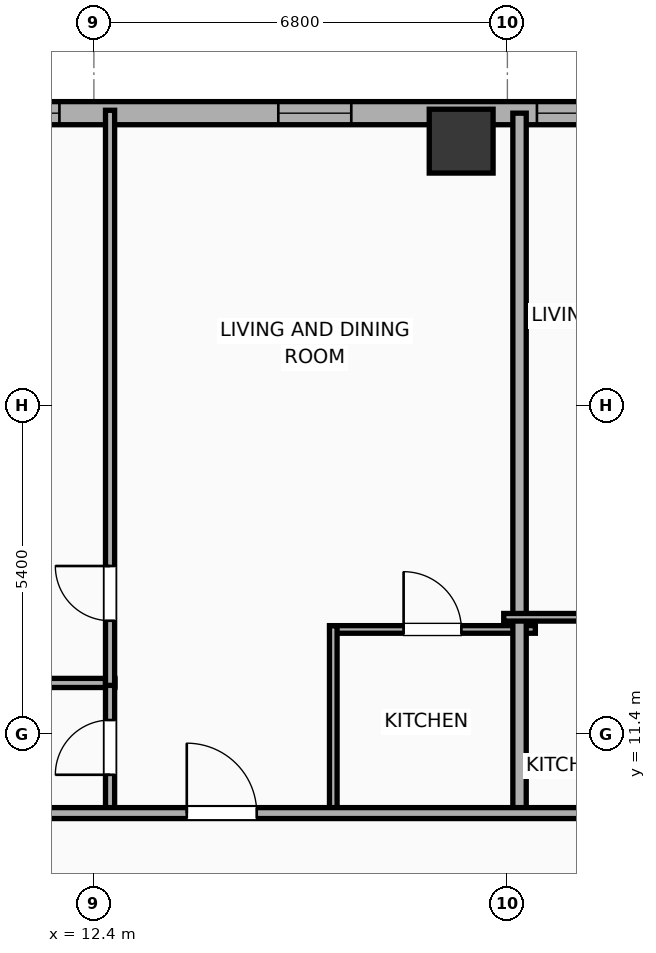
"""IFC4 building model, lengths in metres.
Left out: names, types, materials, properties, quantities, classifications, styles, units other than length and angle.
Written with IfcOpenShell. Run it as: python <this file> out.ifc"""

import sys

from ifc_helpers import new_model, si_unit, direction, frame, frame_2d, origin, origin_2d, place, context, subcontext, project, spatial, rectangle, hollow_rectangle, extrude, element, fill, save


model = new_model("IFC4")
c1 = context("Model", 3, precision=1e-05, world=origin(), true_north=direction((0.0, 1.0)))
c2 = subcontext(c1, "Body", "Model", "MODEL_VIEW")
j1 = project(units=[si_unit("LENGTHUNIT", "METRE"), si_unit("PLANEANGLEUNIT", "RADIAN")], contexts=[c1])
p1 = place(None, origin())
s1 = spatial("IfcSite", under=j1, at=p1, CompositionType="ELEMENT")
p2 = place(p1, origin())
s2 = spatial("IfcBuilding", under=s1, at=p2, CompositionType="ELEMENT")
p3 = place(p2, frame((0.0, 0.0, 101.4)))
s3 = spatial("IfcBuildingStorey", under=s2, at=p3, CompositionType="ELEMENT", Elevation=101.4)
p4 = place(p3, frame((18.44, 21.15, 0.0), z_axis=(0.0, 0.0, 1.0), x_axis=(1.0, 0.0, 0.0)))
e1 = element("IfcColumn", 1, at=p4, inside=s3, PredefinedType="COLUMN", context=c2, shape_type="SweptSolid", body=[
    extrude(hollow_rectangle(XDim=1.05, YDim=1.05, WallThickness=0.036, at=origin_2d()), origin(), (0.0, 0.0, 1.0), 3.9),
])
p5 = place(p3, frame((-25.381, 21.61, 0.0), z_axis=(0.0, 0.0, 1.0), x_axis=(1.0, 0.0, 0.0)))
e2 = element("IfcWall", 2, at=p5, inside=s3, PredefinedType="ELEMENTEDWALL", context=c2, shape_type="SweptSolid", body=[
    extrude(rectangle(XDim=54.763, YDim=0.38, at=frame_2d((27.381, 0.0))), origin(), (0.0, 0.0, 1.0), 3.65),
])
p6 = place(p5, frame((45.067, 0.0, 0.75)))
e3 = element("IfcOpeningElement", 3, at=p6, cuts=e2, PredefinedType="OPENING", context=c2, shape_type="SweptSolid", body=[
    extrude(rectangle(XDim=2.4, YDim=2.1, at=frame_2d((1.2, 1.05))), frame((0.0, 0.2, 0.0), z_axis=(0.0, -1.0, 0.0), x_axis=(1.0, 0.0, 0.0)), (0.0, 0.0, 1.0), 0.4),
])
p7 = place(p5, frame((4.076, 0.0, 0.75)))
e4 = element("IfcOpeningElement", 4, at=p7, cuts=e2, PredefinedType="OPENING", context=c2, shape_type="SweptSolid", body=[
    extrude(rectangle(XDim=1.2, YDim=2.05, at=frame_2d((0.6, 1.025))), frame((0.0, 0.2, 0.0), z_axis=(0.0, -1.0, 0.0), x_axis=(1.0, 0.0, 0.0)), (0.0, 0.0, 1.0), 0.4),
])
p8 = place(p5, frame((9.395, 0.0, 0.75)))
e5 = element("IfcOpeningElement", 5, at=p8, cuts=e2, PredefinedType="OPENING", context=c2, shape_type="SweptSolid", body=[
    extrude(rectangle(XDim=0.85, YDim=2.05, at=frame_2d((0.425, 1.025))), frame((0.0, 0.2, 0.0), z_axis=(0.0, -1.0, 0.0), x_axis=(1.0, 0.0, 0.0)), (0.0, 0.0, 1.0), 0.4),
])
p9 = place(p5, frame((7.205, 0.0, 0.75)))
e6 = element("IfcOpeningElement", 6, at=p9, cuts=e2, PredefinedType="OPENING", context=c2, shape_type="SweptSolid", body=[
    extrude(rectangle(XDim=1.2, YDim=2.05, at=frame_2d((0.6, 1.025))), frame((0.0, 0.2, 0.0), z_axis=(0.0, -1.0, 0.0), x_axis=(1.0, 0.0, 0.0)), (0.0, 0.0, 1.0), 0.4),
])
p10 = place(p5, frame((13.676, 0.0, 0.75)))
e7 = element("IfcOpeningElement", 7, at=p10, cuts=e2, PredefinedType="OPENING", context=c2, shape_type="SweptSolid", body=[
    extrude(rectangle(XDim=1.2, YDim=2.05, at=frame_2d((0.6, 1.025))), frame((0.0, 0.2, 0.0), z_axis=(0.0, -1.0, 0.0), x_axis=(1.0, 0.0, 0.0)), (0.0, 0.0, 1.0), 0.4),
])
p11 = place(p5, frame((17.136, 0.0, 0.75)))
e8 = element("IfcOpeningElement", 8, at=p11, cuts=e2, PredefinedType="OPENING", context=c2, shape_type="SweptSolid", body=[
    extrude(rectangle(XDim=1.2, YDim=2.05, at=frame_2d((0.6, 1.025))), frame((0.0, 0.2, 0.0), z_axis=(0.0, -1.0, 0.0), x_axis=(1.0, 0.0, 0.0)), (0.0, 0.0, 1.0), 0.4),
])
p12 = place(p5, frame((22.656, 0.0, 0.75)))
e9 = element("IfcOpeningElement", 9, at=p12, cuts=e2, PredefinedType="OPENING", context=c2, shape_type="SweptSolid", body=[
    extrude(rectangle(XDim=1.2, YDim=2.05, at=frame_2d((0.6, 1.025))), frame((0.0, 0.2, 0.0), z_axis=(0.0, -1.0, 0.0), x_axis=(1.0, 0.0, 0.0)), (0.0, 0.0, 1.0), 0.4),
])
p13 = place(p5, frame((29.443, 0.0, 0.75)))
e10 = element("IfcOpeningElement", 10, at=p13, cuts=e2, PredefinedType="OPENING", context=c2, shape_type="SweptSolid", body=[
    extrude(rectangle(XDim=1.2, YDim=2.05, at=frame_2d((0.6, 1.025))), frame((0.0, 0.2, 0.0), z_axis=(0.0, -1.0, 0.0), x_axis=(1.0, 0.0, 0.0)), (0.0, 0.0, 1.0), 0.4),
])
p14 = place(p5, frame((26.348, 0.0, 0.75)))
e11 = element("IfcOpeningElement", 11, at=p14, cuts=e2, PredefinedType="OPENING", context=c2, shape_type="SweptSolid", body=[
    extrude(rectangle(XDim=1.2, YDim=2.05, at=frame_2d((0.6, 1.025))), frame((0.0, 0.2, 0.0), z_axis=(0.0, -1.0, 0.0), x_axis=(1.0, 0.0, 0.0)), (0.0, 0.0, 1.0), 0.4),
])
p15 = place(p5, frame((33.596, 0.0, 0.75)))
e12 = element("IfcOpeningElement", 12, at=p15, cuts=e2, PredefinedType="OPENING", context=c2, shape_type="SweptSolid", body=[
    extrude(rectangle(XDim=1.2, YDim=2.05, at=frame_2d((0.6, 1.025))), frame((0.0, 0.2, 0.0), z_axis=(0.0, -1.0, 0.0), x_axis=(1.0, 0.0, 0.0)), (0.0, 0.0, 1.0), 0.4),
])
p16 = place(p5, frame((36.014, 0.0, 0.75)))
e13 = element("IfcOpeningElement", 13, at=p16, cuts=e2, PredefinedType="OPENING", context=c2, shape_type="SweptSolid", body=[
    extrude(rectangle(XDim=1.2, YDim=2.05, at=frame_2d((0.6, 1.025))), frame((0.0, 0.2, 0.0), z_axis=(0.0, -1.0, 0.0), x_axis=(1.0, 0.0, 0.0)), (0.0, 0.0, 1.0), 0.4),
])
p17 = place(p5, frame((40.814, 0.0, 0.75)))
e14 = element("IfcOpeningElement", 14, at=p17, cuts=e2, PredefinedType="OPENING", context=c2, shape_type="SweptSolid", body=[
    extrude(rectangle(XDim=1.2, YDim=2.05, at=frame_2d((0.6, 1.025))), frame((0.0, 0.2, 0.0), z_axis=(0.0, -1.0, 0.0), x_axis=(1.0, 0.0, 0.0)), (0.0, 0.0, 1.0), 0.4),
])
p18 = place(p5, frame((49.385, 0.0, 0.75)))
e15 = element("IfcOpeningElement", 15, at=p18, cuts=e2, PredefinedType="OPENING", context=c2, shape_type="SweptSolid", body=[
    extrude(rectangle(XDim=1.2, YDim=2.05, at=frame_2d((0.6, 1.025))), frame((0.0, 0.2, 0.0), z_axis=(0.0, -1.0, 0.0), x_axis=(1.0, 0.0, 0.0)), (0.0, 0.0, 1.0), 0.4),
])
p19 = place(p5, frame((52.181, 0.0, 0.75)))
e16 = element("IfcOpeningElement", 16, at=p19, cuts=e2, PredefinedType="OPENING", context=c2, shape_type="SweptSolid", body=[
    extrude(rectangle(XDim=1.2, YDim=2.05, at=frame_2d((0.6, 1.025))), frame((0.0, 0.2, 0.0), z_axis=(0.0, -1.0, 0.0), x_axis=(1.0, 0.0, 0.0)), (0.0, 0.0, 1.0), 0.4),
])
p20 = place(p3, frame((9.54, 12.24, 0.0), z_axis=(0.0, 0.0, 1.0), x_axis=(1.0, 0.0, 0.0)))
e17 = element("IfcWall", 17, at=p20, inside=s3, PredefinedType="PLUMBINGWALL", context=c2, shape_type="SweptSolid", body=[
    extrude(rectangle(XDim=3.206, YDim=0.15, at=frame_2d((1.603, 0.0))), origin(), (0.0, 0.0, 1.0), 3.65),
])
p21 = place(p3, frame((12.666, 10.08, 0.0), z_axis=(0.0, 0.0, 1.0), x_axis=(0.0, 1.0, 0.0)))
e18 = element("IfcWall", 18, at=p21, inside=s3, PredefinedType="PLUMBINGWALL", context=c2, shape_type="SweptSolid", body=[
    extrude(rectangle(XDim=2.2, YDim=0.15, at=frame_2d((1.1, 0.0))), origin(), (0.0, 0.0, 1.0), 3.65),
])
p22 = place(p21, frame((0.65, 0.0, 0.0)))
e19 = element("IfcOpeningElement", 19, at=p22, cuts=e18, PredefinedType="OPENING", context=c2, shape_type="SweptSolid", body=[
    extrude(rectangle(XDim=0.9, YDim=2.05, at=frame_2d((0.45, 1.025))), frame((0.0, 0.085, 0.0), z_axis=(0.0, -1.0, 0.0), x_axis=(1.0, 0.0, 0.0)), (0.0, 0.0, 1.0), 0.17),
])
p23 = place(p3, frame((12.666, 12.2, 0.0), z_axis=(0.0, 0.0, 1.0), x_axis=(0.0, 1.0, 0.0)))
e20 = element("IfcWall", 20, at=p23, inside=s3, PredefinedType="PLUMBINGWALL", context=c2, shape_type="SweptSolid", body=[
    extrude(rectangle(XDim=9.458, YDim=0.15, at=frame_2d((4.729, 0.0))), origin(), (0.0, 0.0, 1.0), 3.65),
])
p24 = place(p23, frame((1.063, 0.0, 0.0)))
e21 = element("IfcOpeningElement", 21, at=p24, cuts=e20, PredefinedType="OPENING", context=c2, shape_type="SweptSolid", body=[
    extrude(rectangle(XDim=0.9, YDim=2.05, at=frame_2d((0.45, 1.025))), frame((0.0, 0.085, 0.0), z_axis=(0.0, -1.0, 0.0), x_axis=(1.0, 0.0, 0.0)), (0.0, 0.0, 1.0), 0.17),
])
p25 = place(p3, frame((16.277, 13.12, 0.0), z_axis=(0.0, 0.0, 1.0), x_axis=(1.0, 0.0, 0.0)))
e22 = element("IfcWall", 22, at=p25, inside=s3, PredefinedType="PARTITIONING", context=c2, shape_type="SweptSolid", body=[
    extrude(rectangle(XDim=3.383, YDim=0.125, at=frame_2d((1.691, 0.0))), origin(), (0.0, 0.0, 1.0), 3.65),
])
p26 = place(p25, frame((1.217, 0.0, 0.0)))
e23 = element("IfcOpeningElement", 23, at=p26, cuts=e22, PredefinedType="OPENING", context=c2, shape_type="SweptSolid", body=[
    extrude(rectangle(XDim=0.95, YDim=2.05, at=frame_2d((0.475, 1.025))), frame((0.0, 0.073, 0.0), z_axis=(0.0, -1.0, 0.0), x_axis=(1.0, 0.0, 0.0)), (0.0, 0.0, 1.0), 0.145),
])
p27 = place(p3, frame((16.337, 10.08, 0.0), z_axis=(0.0, 0.0, 1.0), x_axis=(0.0, 1.0, 0.0)))
e24 = element("IfcWall", 24, at=p27, inside=s3, PredefinedType="PARTITIONING", context=c2, shape_type="SweptSolid", body=[
    extrude(rectangle(XDim=3.1, YDim=0.125, at=frame_2d((1.55, 0.0))), origin(), (0.0, 0.0, 1.0), 3.65),
])
p28 = place(p3, frame((19.4, 10.02, 0.0), z_axis=(0.0, 0.0, 1.0), x_axis=(0.0, 1.0, 0.0)))
e25 = element("IfcWall", 25, at=p28, inside=s3, PredefinedType="PARTITIONING", context=c2, shape_type="SweptSolid", body=[
    extrude(rectangle(XDim=11.59, YDim=0.22, at=frame_2d((5.795, 0.0))), origin(), (0.0, 0.0, 1.0), 3.65),
])
p29 = place(p3, frame((19.14, 13.32, 0.0), z_axis=(0.0, 0.0, 1.0), x_axis=(1.0, 0.0, 0.0)))
e26 = element("IfcWall", 26, at=p29, inside=s3, PredefinedType="PARTITIONING", context=c2, shape_type="SweptSolid", body=[
    extrude(rectangle(XDim=2.69, YDim=0.125, at=frame_2d((1.345, 0.0))), origin(), (0.0, 0.0, 1.0), 3.65),
])
p30 = place(p3, frame((-29.21, 10.1, 0.0), z_axis=(0.0, 0.0, 1.0), x_axis=(1.0, 0.0, 0.0)))
e27 = element("IfcWall", 27, at=p30, inside=s3, PredefinedType="PARTITIONING", context=c2, shape_type="SweptSolid", body=[
    extrude(rectangle(XDim=62.42, YDim=0.18, at=frame_2d((31.21, 0.0))), origin(), (0.0, 0.0, 1.0), 3.65),
])
p31 = place(p30, frame((4.906, 0.0, 0.0)))
e28 = element("IfcOpeningElement", 28, at=p31, cuts=e27, PredefinedType="OPENING", context=c2, shape_type="SweptSolid", body=[
    extrude(rectangle(XDim=1.15, YDim=2.05, at=frame_2d((0.575, 1.025))), frame((0.0, 0.1, 0.0), z_axis=(0.0, -1.0, 0.0), x_axis=(1.0, 0.0, 0.0)), (0.0, 0.0, 1.0), 0.2),
])
p32 = place(p30, frame((14.812, 0.0, 0.0)))
e29 = element("IfcOpeningElement", 29, at=p32, cuts=e27, PredefinedType="OPENING", context=c2, shape_type="SweptSolid", body=[
    extrude(rectangle(XDim=1.15, YDim=2.05, at=frame_2d((0.575, 1.025))), frame((0.0, 0.1, 0.0), z_axis=(0.0, -1.0, 0.0), x_axis=(1.0, 0.0, 0.0)), (0.0, 0.0, 1.0), 0.2),
])
p33 = place(p30, frame((24.406, 0.0, 0.0)))
e30 = element("IfcOpeningElement", 30, at=p33, cuts=e27, PredefinedType="OPENING", context=c2, shape_type="SweptSolid", body=[
    extrude(rectangle(XDim=1.15, YDim=2.05, at=frame_2d((0.575, 1.025))), frame((0.0, 0.1, 0.0), z_axis=(0.0, -1.0, 0.0), x_axis=(1.0, 0.0, 0.0)), (0.0, 0.0, 1.0), 0.2),
])
p34 = place(p30, frame((33.981, 0.0, 0.0)))
e31 = element("IfcOpeningElement", 31, at=p34, cuts=e27, PredefinedType="OPENING", context=c2, shape_type="SweptSolid", body=[
    extrude(rectangle(XDim=1.15, YDim=2.05, at=frame_2d((0.575, 1.025))), frame((0.0, 0.1, 0.0), z_axis=(0.0, -1.0, 0.0), x_axis=(1.0, 0.0, 0.0)), (0.0, 0.0, 1.0), 0.2),
])
p35 = place(p30, frame((43.138, 0.0, 0.0)))
e32 = element("IfcOpeningElement", 32, at=p35, cuts=e27, PredefinedType="OPENING", context=c2, shape_type="SweptSolid", body=[
    extrude(rectangle(XDim=1.15, YDim=2.05, at=frame_2d((0.575, 1.025))), frame((0.0, 0.1, 0.0), z_axis=(0.0, -1.0, 0.0), x_axis=(1.0, 0.0, 0.0)), (0.0, 0.0, 1.0), 0.2),
])
p36 = place(p30, frame((51.777, 0.0, 0.0)))
e33 = element("IfcOpeningElement", 33, at=p36, cuts=e27, PredefinedType="OPENING", context=c2, shape_type="SweptSolid", body=[
    extrude(rectangle(XDim=0.9, YDim=2.05, at=frame_2d((0.45, 1.025))), frame((0.0, 0.1, 0.0), z_axis=(0.0, -1.0, 0.0), x_axis=(1.0, 0.0, 0.0)), (0.0, 0.0, 1.0), 0.2),
])
p37 = place(p30, frame((58.718, 0.0, 0.0)))
e34 = element("IfcOpeningElement", 34, at=p37, cuts=e27, PredefinedType="OPENING", context=c2, shape_type="SweptSolid", body=[
    extrude(rectangle(XDim=0.9, YDim=2.05, at=frame_2d((0.45, 1.025))), frame((0.0, 0.1, 0.0), z_axis=(0.0, -1.0, 0.0), x_axis=(1.0, 0.0, 0.0)), (0.0, 0.0, 1.0), 0.2),
])
p38 = place(p6, origin())
e35 = element("IfcWindow", 35, at=p38, inside=s3, PartitioningType="SINGLE_PANEL", PredefinedType="WINDOW", context=c2, shape_type="SweptSolid", body=[
    extrude(rectangle(XDim=2.4, YDim=2.1, at=frame_2d((1.2, 1.05))), frame((0.0, 0.03, 0.0), z_axis=(0.0, -1.0, 0.0), x_axis=(1.0, 0.0, 0.0)), (0.0, 0.0, 1.0), 0.06),
])
fill(e3, e35)
p39 = place(p16, origin())
e36 = element("IfcWindow", 36, at=p39, inside=s3, PartitioningType="SINGLE_PANEL", PredefinedType="WINDOW", context=c2, shape_type="SweptSolid", body=[
    extrude(rectangle(XDim=1.2, YDim=2.05, at=frame_2d((0.6, 1.025))), frame((0.0, 0.03, 0.0), z_axis=(0.0, -1.0, 0.0), x_axis=(1.0, 0.0, 0.0)), (0.0, 0.0, 1.0), 0.06),
])
fill(e13, e36)
p40 = place(p17, origin())
e37 = element("IfcWindow", 37, at=p40, inside=s3, PartitioningType="SINGLE_PANEL", PredefinedType="WINDOW", context=c2, shape_type="SweptSolid", body=[
    extrude(rectangle(XDim=1.2, YDim=2.05, at=frame_2d((0.6, 1.025))), frame((0.0, 0.03, 0.0), z_axis=(0.0, -1.0, 0.0), x_axis=(1.0, 0.0, 0.0)), (0.0, 0.0, 1.0), 0.06),
])
fill(e14, e37)
p41 = place(p22, origin())
e38 = element("IfcDoor", 38, at=p41, inside=s3, OperationType="SINGLE_SWING_LEFT", PredefinedType="DOOR", context=c2, shape_type="SweptSolid", body=[
    extrude(rectangle(XDim=0.9, YDim=2.05, at=frame_2d((0.45, 1.025))), frame((0.0, 0.025, 0.0), z_axis=(0.0, -1.0, 0.0), x_axis=(1.0, 0.0, 0.0)), (0.0, 0.0, 1.0), 0.05),
])
fill(e19, e38)
p42 = place(p24, origin())
e39 = element("IfcDoor", 39, at=p42, inside=s3, OperationType="SINGLE_SWING_RIGHT", PredefinedType="DOOR", context=c2, shape_type="SweptSolid", body=[
    extrude(rectangle(XDim=0.9, YDim=2.05, at=frame_2d((0.45, 1.025))), frame((0.0, 0.025, 0.0), z_axis=(0.0, -1.0, 0.0), x_axis=(1.0, 0.0, 0.0)), (0.0, 0.0, 1.0), 0.05),
])
fill(e21, e39)
p43 = place(p26, origin())
e40 = element("IfcDoor", 40, at=p43, inside=s3, OperationType="SINGLE_SWING_LEFT", PredefinedType="DOOR", context=c2, shape_type="SweptSolid", body=[
    extrude(rectangle(XDim=0.95, YDim=2.05, at=frame_2d((0.475, 1.025))), frame((0.0, 0.025, 0.0), z_axis=(0.0, -1.0, 0.0), x_axis=(1.0, 0.0, 0.0)), (0.0, 0.0, 1.0), 0.05),
])
fill(e23, e40)
p44 = place(p35, origin())
e41 = element("IfcDoor", 41, at=p44, inside=s3, OperationType="SINGLE_SWING_LEFT", PredefinedType="DOOR", context=c2, shape_type="SweptSolid", body=[
    extrude(rectangle(XDim=1.15, YDim=2.05, at=frame_2d((0.575, 1.025))), frame((0.0, 0.025, 0.0), z_axis=(0.0, -1.0, 0.0), x_axis=(1.0, 0.0, 0.0)), (0.0, 0.0, 1.0), 0.05),
])
fill(e32, e41)
save(model, sys.argv[1])
